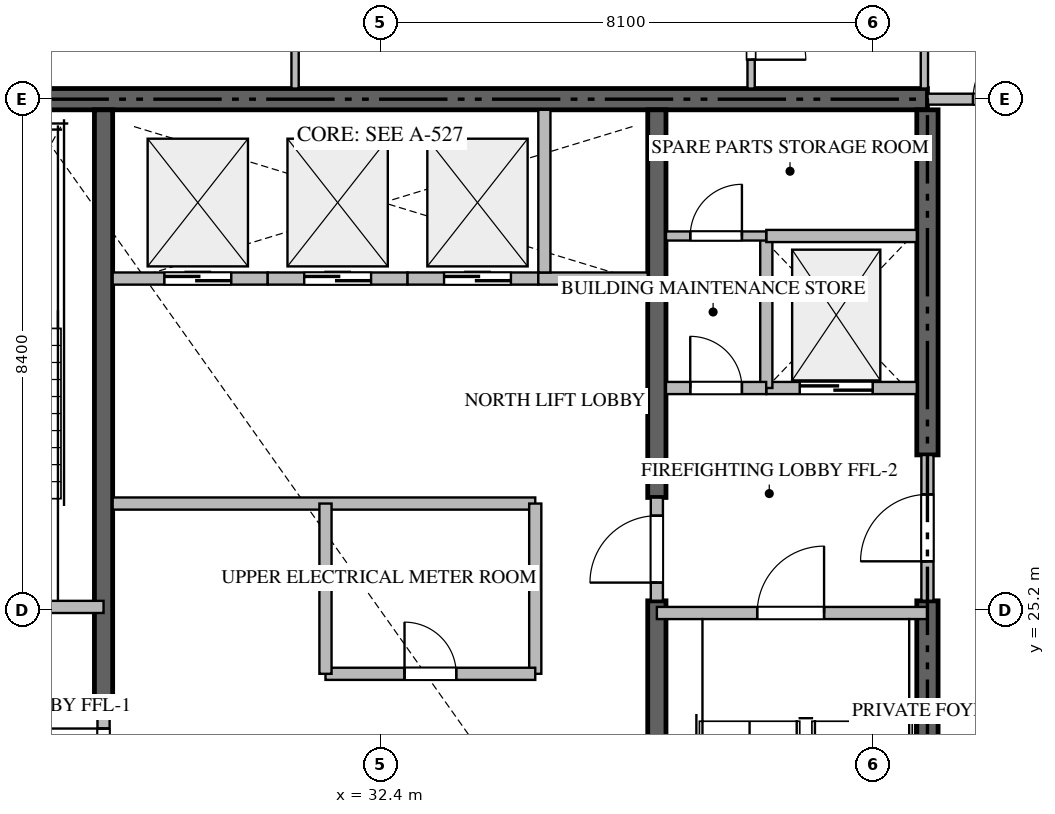
"""IFC4 building model, lengths in metres.
Left out: names, types, materials, properties, quantities, classifications, styles, units other than length and angle.
Written with IfcOpenShell. Run it as: python <this file> out.ifc"""

import sys

from ifc_helpers import new_model, si_unit, direction, frame, frame_2d, origin, place, context, subcontext, project, spatial, rectangle, extrude, source, transform, mapped, element, fill, save


model = new_model("IFC4")
c1 = context("Model", 3, precision=1e-05, world=origin(), true_north=direction((0.0, 1.0)))
c2 = subcontext(c1, "Body", "Model", "MODEL_VIEW")
j1 = project(units=[si_unit("LENGTHUNIT", "METRE"), si_unit("PLANEANGLEUNIT", "RADIAN")], contexts=[c1])
p1 = place(None, origin())
s1 = spatial("IfcSite", under=j1, at=p1, CompositionType="ELEMENT")
p2 = place(p1, origin())
s2 = spatial("IfcBuilding", under=s1, at=p2, CompositionType="ELEMENT")
p3 = place(p2, frame((0.0, 0.0, 260.5)))
s3 = spatial("IfcBuildingStorey", under=s2, at=p3, CompositionType="ELEMENT", Elevation=260.5)
p4 = place(p3, frame((41.4, 33.6, -0.26), z_axis=(0.0, 0.0, 1.0), x_axis=(-1.0, 0.0, 0.0)))
e1 = element("IfcWall", 1, at=p4, inside=s3, PredefinedType="SHEAR", context=c2, shape_type="SweptSolid", body=[
    extrude(rectangle(XDim=18.0, YDim=0.35, at=frame_2d((9.0, 0.0))), origin(), (0.0, 0.0, 1.0), 3.848),
])
p5 = place(p3, frame((41.4, 16.975, -0.26), z_axis=(0.0, 0.0, 1.0), x_axis=(0.0, 1.0, 0.0)))
e2 = element("IfcWall", 2, at=p5, inside=s3, PredefinedType="SHEAR", context=c2, shape_type="SweptSolid", body=[
    extrude(rectangle(XDim=8.375, YDim=0.35, at=frame_2d((4.188, 0.0))), origin(), (0.0, 0.0, 1.0), 3.848),
])
p6 = place(p3, frame((41.4, 27.75, -0.26), z_axis=(0.0, 0.0, 1.0), x_axis=(0.0, 1.0, 0.0)))
e3 = element("IfcWall", 3, at=p6, inside=s3, PredefinedType="SHEAR", context=c2, shape_type="SweptSolid", body=[
    extrude(rectangle(XDim=5.675, YDim=0.35, at=frame_2d((2.837, 0.0))), origin(), (0.0, 0.0, 1.0), 3.848),
])
p7 = place(p3, frame((27.85, 23.55, -0.26), z_axis=(0.0, 0.0, 1.0), x_axis=(0.0, 1.0, 0.0)))
e4 = element("IfcWall", 4, at=p7, inside=s3, PredefinedType="SHEAR", context=c2, shape_type="SweptSolid", body=[
    extrude(rectangle(XDim=9.875, YDim=0.3, at=frame_2d((4.938, 0.0))), origin(), (0.0, 0.0, 1.0), 3.848),
])
p8 = place(p3, frame((36.95, 16.975, -0.26), z_axis=(0.0, 0.0, 1.0), x_axis=(0.0, 1.0, 0.0)))
e5 = element("IfcWall", 5, at=p8, inside=s3, PredefinedType="SHEAR", context=c2, shape_type="SweptSolid", body=[
    extrude(rectangle(XDim=8.375, YDim=0.3, at=frame_2d((4.188, 0.0))), origin(), (0.0, 0.0, 1.0), 3.848),
])
p9 = place(p3, frame((36.95, 27.05, -0.26), z_axis=(0.0, 0.0, 1.0), x_axis=(0.0, 1.0, 0.0)))
e6 = element("IfcWall", 6, at=p9, inside=s3, PredefinedType="SHEAR", context=c2, shape_type="SweptSolid", body=[
    extrude(rectangle(XDim=6.375, YDim=0.3, at=frame_2d((3.188, 0.0))), origin(), (0.0, 0.0, 1.0), 3.848),
])
p10 = place(p3, frame((23.4, 25.25, 0.0), z_axis=(0.0, 0.0, 1.0), x_axis=(1.0, 0.0, 0.0)))
e7 = element("IfcWall", 7, at=p10, inside=s3, PredefinedType="STANDARD", context=c2, shape_type="SweptSolid", body=[
    extrude(rectangle(XDim=4.45, YDim=0.2, at=frame_2d((2.225, 0.0))), origin(), (0.0, 0.0, 1.0), 3.59),
])
p11 = place(p10, frame((1.65, 0.0, 0.0)))
e8 = element("IfcOpeningElement", 8, at=p11, cuts=e7, PredefinedType="OPENING", context=c2, shape_type="SweptSolid", body=[
    extrude(rectangle(XDim=1.1, YDim=2.15, at=frame_2d((0.55, 1.075))), frame((0.0, 0.11, 0.0), z_axis=(0.0, -1.0, 0.0), x_axis=(1.0, 0.0, 0.0)), (0.0, 0.0, 1.0), 0.22),
])
p12 = place(p3, frame((36.95, 25.15, 0.0), z_axis=(0.0, 0.0, 1.0), x_axis=(1.0, 0.0, 0.0)))
e9 = element("IfcWall", 9, at=p12, inside=s3, PredefinedType="STANDARD", context=c2, shape_type="SweptSolid", body=[
    extrude(rectangle(XDim=4.45, YDim=0.2, at=frame_2d((2.225, 0.0))), origin(), (0.0, 0.0, 1.0), 3.59),
])
p13 = place(p12, frame((1.65, 0.0, 0.0)))
e10 = element("IfcOpeningElement", 10, at=p13, cuts=e9, PredefinedType="OPENING", context=c2, shape_type="SweptSolid", body=[
    extrude(rectangle(XDim=1.1, YDim=2.15, at=frame_2d((0.55, 1.075))), frame((0.0, 0.11, 0.0), z_axis=(0.0, -1.0, 0.0), x_axis=(1.0, 0.0, 0.0)), (0.0, 0.0, 1.0), 0.22),
])
p14 = place(p3, frame((38.75, 28.85, 0.0), z_axis=(0.0, 0.0, 1.0), x_axis=(1.0, 0.0, 0.0)))
e11 = element("IfcWall", 11, at=p14, inside=s3, PredefinedType="STANDARD", context=c2, shape_type="SweptSolid", body=[
    extrude(rectangle(XDim=2.475, YDim=0.2, at=frame_2d((1.238, 0.0))), origin(), (0.0, 0.0, 1.0), 3.59),
])
p15 = place(p14, frame((0.55, 0.0, 0.0)))
e12 = element("IfcOpeningElement", 12, at=p15, cuts=e11, PredefinedType="OPENING", context=c2, shape_type="SweptSolid", body=[
    extrude(rectangle(XDim=1.2, YDim=2.2, at=frame_2d((0.6, 1.1))), frame((0.0, 0.11, 0.0), z_axis=(0.0, -1.0, 0.0), x_axis=(1.0, 0.0, 0.0)), (0.0, 0.0, 1.0), 0.22),
])
p16 = place(p3, frame((28.0, 30.65, 0.0), z_axis=(0.0, 0.0, 1.0), x_axis=(1.0, 0.0, 0.0)))
e13 = element("IfcWall", 13, at=p16, inside=s3, PredefinedType="STANDARD", context=c2, shape_type="SweptSolid", body=[
    extrude(rectangle(XDim=2.55, YDim=0.2, at=frame_2d((1.275, 0.0))), origin(), (0.0, 0.0, 1.0), 3.59),
])
p17 = place(p16, frame((0.85, 0.0, 0.0)))
e14 = element("IfcOpeningElement", 14, at=p17, cuts=e13, PredefinedType="OPENING", context=c2, shape_type="SweptSolid", body=[
    extrude(rectangle(XDim=1.1, YDim=2.2, at=frame_2d((0.55, 1.1))), frame((0.0, 0.11, 0.0), z_axis=(0.0, -1.0, 0.0), x_axis=(1.0, 0.0, 0.0)), (0.0, 0.0, 1.0), 0.22),
])
p18 = place(p3, frame((30.55, 30.65, 0.0), z_axis=(0.0, 0.0, 1.0), x_axis=(1.0, 0.0, 0.0)))
e15 = element("IfcWall", 15, at=p18, inside=s3, PredefinedType="STANDARD", context=c2, shape_type="SweptSolid", body=[
    extrude(rectangle(XDim=2.3, YDim=0.2, at=frame_2d((1.15, 0.0))), origin(), (0.0, 0.0, 1.0), 3.59),
])
p19 = place(p18, frame((0.6, 0.0, 0.0)))
e16 = element("IfcOpeningElement", 16, at=p19, cuts=e15, PredefinedType="OPENING", context=c2, shape_type="SweptSolid", body=[
    extrude(rectangle(XDim=1.1, YDim=2.2, at=frame_2d((0.55, 1.1))), frame((0.0, 0.11, 0.0), z_axis=(0.0, -1.0, 0.0), x_axis=(1.0, 0.0, 0.0)), (0.0, 0.0, 1.0), 0.22),
])
p20 = place(p3, frame((32.85, 30.65, 0.0), z_axis=(0.0, 0.0, 1.0), x_axis=(1.0, 0.0, 0.0)))
e17 = element("IfcWall", 17, at=p20, inside=s3, PredefinedType="STANDARD", context=c2, shape_type="SweptSolid", body=[
    extrude(rectangle(XDim=2.15, YDim=0.2, at=frame_2d((1.075, 0.0))), origin(), (0.0, 0.0, 1.0), 3.59),
])
p21 = place(p20, frame((0.6, 0.0, 0.0)))
e18 = element("IfcOpeningElement", 18, at=p21, cuts=e17, PredefinedType="OPENING", context=c2, shape_type="SweptSolid", body=[
    extrude(rectangle(XDim=1.1, YDim=2.2, at=frame_2d((0.55, 1.1))), frame((0.0, 0.11, 0.0), z_axis=(0.0, -1.0, 0.0), x_axis=(1.0, 0.0, 0.0)), (0.0, 0.0, 1.0), 0.22),
])
p22 = place(p3, frame((35.0, 30.65, 0.0), z_axis=(0.0, 0.0, 1.0), x_axis=(1.0, 0.0, 0.0)))
e19 = element("IfcWall", 19, at=p22, inside=s3, PredefinedType="STANDARD", context=c2, shape_type="SweptSolid", body=[
    extrude(rectangle(XDim=1.8, YDim=0.2, at=frame_2d((0.9, 0.0))), origin(), (0.0, 0.0, 1.0), 3.59),
])
p23 = place(p3, frame((35.1, 30.75, 0.0), z_axis=(0.0, 0.0, 1.0), x_axis=(0.0, 1.0, 0.0)))
e20 = element("IfcWall", 20, at=p23, inside=s3, PredefinedType="STANDARD", context=c2, shape_type="SweptSolid", body=[
    extrude(rectangle(XDim=2.675, YDim=0.2, at=frame_2d((1.337, 0.0))), origin(), (0.0, 0.0, 1.0), 3.59),
])
p24 = place(p3, frame((38.75, 28.85, 0.0), z_axis=(0.0, 0.0, 1.0), x_axis=(0.0, 1.0, 0.0)))
e21 = element("IfcWall", 21, at=p24, inside=s3, PredefinedType="STANDARD", context=c2, shape_type="SweptSolid", body=[
    extrude(rectangle(XDim=2.5, YDim=0.2, at=frame_2d((1.25, 0.0))), origin(), (0.0, 0.0, 1.0), 3.59),
])
p25 = place(p3, frame((38.75, 31.35, 0.0), z_axis=(0.0, 0.0, 1.0), x_axis=(1.0, 0.0, 0.0)))
e22 = element("IfcWall", 22, at=p25, inside=s3, PredefinedType="STANDARD", context=c2, shape_type="SweptSolid", body=[
    extrude(rectangle(XDim=2.475, YDim=0.2, at=frame_2d((1.238, 0.0))), origin(), (0.0, 0.0, 1.0), 3.59),
])
p26 = place(p3, frame((37.1, 28.85, 0.0), z_axis=(0.0, 0.0, 1.0), x_axis=(1.0, 0.0, 0.0)))
e23 = element("IfcWall", 23, at=p26, inside=s3, PredefinedType="STANDARD", context=c2, shape_type="SweptSolid", body=[
    extrude(rectangle(XDim=1.648, YDim=0.2, at=frame_2d((0.824, 0.0))), origin(), (0.0, 0.0, 1.0), 3.59),
])
p27 = place(p26, frame((0.399, 0.0, 0.0)))
e24 = element("IfcOpeningElement", 24, at=p27, cuts=e23, PredefinedType="OPENING", context=c2, shape_type="SweptSolid", body=[
    extrude(rectangle(XDim=0.85, YDim=2.1, at=frame_2d((0.425, 1.05))), frame((0.0, 0.11, 0.0), z_axis=(0.0, -1.0, 0.0), x_axis=(1.0, 0.0, 0.0)), (0.0, 0.0, 1.0), 0.22),
])
p28 = place(p3, frame((41.4, 25.352, 0.0), z_axis=(0.0, 0.0, 1.0), x_axis=(0.0, 1.0, 0.0)))
e25 = element("IfcWall", 25, at=p28, inside=s3, PredefinedType="STANDARD", context=c2, shape_type="SweptSolid", body=[
    extrude(rectangle(XDim=2.396, YDim=0.2, at=frame_2d((1.198, 0.0))), origin(), (0.0, 0.0, 1.0), 3.59),
])
p29 = place(p28, frame((0.648, 0.0, 0.0)))
e26 = element("IfcOpeningElement", 26, at=p29, cuts=e25, PredefinedType="OPENING", context=c2, shape_type="SweptSolid", body=[
    extrude(rectangle(XDim=1.1, YDim=2.15, at=frame_2d((0.55, 1.075))), frame((0.0, 0.11, 0.0), z_axis=(0.0, -1.0, 0.0), x_axis=(1.0, 0.0, 0.0)), (0.0, 0.0, 1.0), 0.22),
])
p30 = place(p3, frame((27.85, 21.852, 0.0), z_axis=(0.0, 0.0, 1.0), x_axis=(0.0, 1.0, 0.0)))
e27 = element("IfcWall", 27, at=p30, inside=s3, PredefinedType="STANDARD", context=c2, shape_type="SweptSolid", body=[
    extrude(rectangle(XDim=1.696, YDim=0.2, at=frame_2d((0.848, 0.0))), origin(), (0.0, 0.0, 1.0), 3.59),
])
p31 = place(p30, frame((0.298, 0.0, 0.0)))
e28 = element("IfcOpeningElement", 28, at=p31, cuts=e27, PredefinedType="OPENING", context=c2, shape_type="SweptSolid", body=[
    extrude(rectangle(XDim=1.1, YDim=2.15, at=frame_2d((0.55, 1.075))), frame((0.0, 0.11, 0.0), z_axis=(0.0, -1.0, 0.0), x_axis=(1.0, 0.0, 0.0)), (0.0, 0.0, 1.0), 0.22),
])
p32 = place(p3, frame((36.95, 25.352, 0.0), z_axis=(0.0, 0.0, 1.0), x_axis=(0.0, 1.0, 0.0)))
e29 = element("IfcWall", 29, at=p32, inside=s3, PredefinedType="STANDARD", context=c2, shape_type="SweptSolid", body=[
    extrude(rectangle(XDim=1.696, YDim=0.2, at=frame_2d((0.848, 0.0))), origin(), (0.0, 0.0, 1.0), 3.59),
])
p33 = place(p32, frame((0.298, 0.0, 0.0)))
e30 = element("IfcOpeningElement", 30, at=p33, cuts=e29, PredefinedType="OPENING", context=c2, shape_type="SweptSolid", body=[
    extrude(rectangle(XDim=1.1, YDim=2.15, at=frame_2d((0.55, 1.075))), frame((0.0, 0.11, 0.0), z_axis=(0.0, -1.0, 0.0), x_axis=(1.0, 0.0, 0.0)), (0.0, 0.0, 1.0), 0.22),
])
p34 = place(p3, frame((37.1, 31.35, 0.0), z_axis=(0.0, 0.0, 1.0), x_axis=(1.0, 0.0, 0.0)))
e31 = element("IfcWall", 31, at=p34, inside=s3, PredefinedType="PARTITIONING", context=c2, shape_type="SweptSolid", body=[
    extrude(rectangle(XDim=1.648, YDim=0.15, at=frame_2d((0.824, 0.0))), origin(), (0.0, 0.0, 1.0), 3.59),
])
p35 = place(p34, frame((0.399, 0.0, 0.0)))
e32 = element("IfcOpeningElement", 32, at=p35, cuts=e31, PredefinedType="OPENING", context=c2, shape_type="SweptSolid", body=[
    extrude(rectangle(XDim=0.85, YDim=2.1, at=frame_2d((0.425, 1.05))), frame((0.0, 0.085, 0.0), z_axis=(0.0, -1.0, 0.0), x_axis=(1.0, 0.0, 0.0)), (0.0, 0.0, 1.0), 0.17),
])
p36 = place(p3, frame((28.0, 26.95, 0.0), z_axis=(0.0, 0.0, 1.0), x_axis=(1.0, 0.0, 0.0)))
e33 = element("IfcWall", 33, at=p36, inside=s3, PredefinedType="STANDARD", context=c2, shape_type="SweptSolid", body=[
    extrude(rectangle(XDim=6.95, YDim=0.2, at=frame_2d((3.475, 0.0))), origin(), (0.0, 0.0, 1.0), 3.59),
])
p37 = place(p3, frame((34.95, 24.15, 0.0), z_axis=(0.0, 0.0, 1.0), x_axis=(0.0, 1.0, 0.0)))
e34 = element("IfcWall", 34, at=p37, inside=s3, PredefinedType="STANDARD", context=c2, shape_type="SweptSolid", body=[
    extrude(rectangle(XDim=2.8, YDim=0.2, at=frame_2d((1.4, 0.0))), origin(), (0.0, 0.0, 1.0), 3.59),
])
p38 = place(p3, frame((31.5, 24.15, 0.0), z_axis=(0.0, 0.0, 1.0), x_axis=(1.0, 0.0, 0.0)))
e35 = element("IfcWall", 35, at=p38, inside=s3, PredefinedType="STANDARD", context=c2, shape_type="SweptSolid", body=[
    extrude(rectangle(XDim=3.45, YDim=0.2, at=frame_2d((1.725, 0.0))), origin(), (0.0, 0.0, 1.0), 3.59),
])
p39 = place(p38, frame((1.3, 0.0, 0.0)))
e36 = element("IfcOpeningElement", 36, at=p39, cuts=e35, PredefinedType="OPENING", context=c2, shape_type="SweptSolid", body=[
    extrude(rectangle(XDim=0.85, YDim=2.1, at=frame_2d((0.425, 1.05))), frame((0.0, 0.11, 0.0), z_axis=(0.0, -1.0, 0.0), x_axis=(1.0, 0.0, 0.0)), (0.0, 0.0, 1.0), 0.22),
])
p40 = place(p3, frame((31.5, 24.15, 0.0), z_axis=(0.0, 0.0, 1.0), x_axis=(0.0, 1.0, 0.0)))
e37 = element("IfcWall", 37, at=p40, inside=s3, PredefinedType="STANDARD", context=c2, shape_type="SweptSolid", body=[
    extrude(rectangle(XDim=2.8, YDim=0.2, at=frame_2d((1.4, 0.0))), origin(), (0.0, 0.0, 1.0), 3.59),
])
p41 = place(p3, frame((41.402, 33.6, 0.0), z_axis=(0.0, 0.0, 1.0), x_axis=(1.0, 0.0, 0.0)))
e38 = element("IfcWall", 38, at=p41, inside=s3, PredefinedType="PARTITIONING", context=c2, shape_type="SweptSolid", body=[
    extrude(rectangle(XDim=2.496, YDim=0.18, at=frame_2d((1.248, 0.0))), origin(), (0.0, 0.0, 1.0), 3.59),
])
p42 = place(p41, frame((0.748, 0.0, 0.0)))
e39 = element("IfcOpeningElement", 39, at=p42, cuts=e38, PredefinedType="OPENING", context=c2, shape_type="SweptSolid", body=[
    extrude(rectangle(XDim=1.0, YDim=2.15, at=frame_2d((0.5, 1.075))), frame((0.0, 0.1, 0.0), z_axis=(0.0, -1.0, 0.0), x_axis=(1.0, 0.0, 0.0)), (0.0, 0.0, 1.0), 0.2),
])
p43 = place(p3, frame((41.35, 36.35, 0.0), z_axis=(0.0, 0.0, 1.0), x_axis=(0.0, -1.0, 0.0)))
e40 = element("IfcWall", 40, at=p43, inside=s3, PredefinedType="PARTITIONING", context=c2, shape_type="SweptSolid", body=[
    extrude(rectangle(XDim=2.575, YDim=0.12, at=frame_2d((1.288, 0.0))), origin(), (0.0, 0.0, 1.0), 3.59),
])
p44 = place(p3, frame((38.5, 35.75, 0.0), z_axis=(0.0, 0.0, 1.0), x_axis=(0.0, -1.0, 0.0)))
e41 = element("IfcWall", 41, at=p44, inside=s3, PredefinedType="PARTITIONING", context=c2, shape_type="SweptSolid", body=[
    extrude(rectangle(XDim=1.975, YDim=0.12, at=frame_2d((0.988, 0.0))), origin(), (0.0, 0.0, 1.0), 3.59),
])
p45 = place(p44, frame((0.601, 0.0, 0.0)))
e42 = element("IfcOpeningElement", 42, at=p45, cuts=e41, PredefinedType="OPENING", context=c2, shape_type="SweptSolid", body=[
    extrude(rectangle(XDim=0.9, YDim=2.1, at=frame_2d((0.45, 1.05))), frame((0.0, 0.07, 0.0), z_axis=(0.0, -1.0, 0.0), x_axis=(1.0, 0.0, 0.0)), (0.0, 0.0, 1.0), 0.14),
])
p46 = place(p3, frame((31.0, 35.748, 0.0), z_axis=(0.0, 0.0, 1.0), x_axis=(0.0, -1.0, 0.0)))
e43 = element("IfcWall", 43, at=p46, inside=s3, PredefinedType="PARTITIONING", context=c2, shape_type="SweptSolid", body=[
    extrude(rectangle(XDim=1.973, YDim=0.12, at=frame_2d((0.987, 0.0))), origin(), (0.0, 0.0, 1.0), 3.59),
])
m1 = source(origin(), c2, "Body", "SweptSolid", [
    extrude(rectangle(XDim=1.1, YDim=2.15, at=frame_2d((0.55, 1.075))), frame((0.0, 0.025, 0.0), z_axis=(0.0, -1.0, 0.0), x_axis=(1.0, 0.0, 0.0)), (0.0, 0.0, 1.0), 0.05),
])
p47 = place(p13, origin())
e44 = element("IfcDoor", 44, at=p47, inside=s3, OperationType="SINGLE_SWING_RIGHT", PredefinedType="DOOR", context=c2, shape_type="MappedRepresentation", body=[
    mapped(m1, transform((0.0, 0.0, 0.0), scale=1.0)),
])
fill(e10, e44)
m2 = source(origin(), c2, "Body", "SweptSolid", [
    extrude(rectangle(XDim=1.2, YDim=2.2, at=frame_2d((0.6, 1.1))), frame((0.0, 0.025, 0.0), z_axis=(0.0, -1.0, 0.0), x_axis=(1.0, 0.0, 0.0)), (0.0, 0.0, 1.0), 0.05),
])
p48 = place(p15, origin())
e45 = element("IfcDoor", 45, at=p48, inside=s3, OperationType="DOUBLE_DOOR_SLIDING", PredefinedType="DOOR", context=c2, shape_type="MappedRepresentation", body=[
    mapped(m2, transform((0.0, 0.0, 0.0), scale=1.0)),
])
fill(e12, e45)
m3 = source(origin(), c2, "Body", "SweptSolid", [
    extrude(rectangle(XDim=1.1, YDim=2.2, at=frame_2d((0.55, 1.1))), frame((0.0, 0.025, 0.0), z_axis=(0.0, -1.0, 0.0), x_axis=(1.0, 0.0, 0.0)), (0.0, 0.0, 1.0), 0.05),
])
p49 = place(p17, origin())
e46 = element("IfcDoor", 46, at=p49, inside=s3, OperationType="DOUBLE_DOOR_SLIDING", PredefinedType="DOOR", context=c2, shape_type="MappedRepresentation", body=[
    mapped(m3, transform((0.0, 0.0, 0.0), scale=1.0)),
])
fill(e14, e46)
p50 = place(p19, origin())
e47 = element("IfcDoor", 47, at=p50, inside=s3, OperationType="DOUBLE_DOOR_SLIDING", PredefinedType="DOOR", context=c2, shape_type="MappedRepresentation", body=[
    mapped(m3, transform((0.0, 0.0, 0.0), scale=1.0)),
])
fill(e16, e47)
p51 = place(p21, origin())
e48 = element("IfcDoor", 48, at=p51, inside=s3, OperationType="DOUBLE_DOOR_SLIDING", PredefinedType="DOOR", context=c2, shape_type="MappedRepresentation", body=[
    mapped(m3, transform((0.0, 0.0, 0.0), scale=1.0)),
])
fill(e18, e48)
m4 = source(origin(), c2, "Body", "SweptSolid", [
    extrude(rectangle(XDim=0.85, YDim=2.1, at=frame_2d((0.425, 1.05))), frame((0.0, 0.025, 0.0), z_axis=(0.0, -1.0, 0.0), x_axis=(1.0, 0.0, 0.0)), (0.0, 0.0, 1.0), 0.05),
])
p52 = place(p27, origin())
e49 = element("IfcDoor", 49, at=p52, inside=s3, OperationType="SINGLE_SWING_LEFT", PredefinedType="DOOR", context=c2, shape_type="MappedRepresentation", body=[
    mapped(m4, transform((0.0, 0.0, 0.0), scale=1.0)),
])
fill(e24, e49)
p53 = place(p29, origin())
e50 = element("IfcDoor", 50, at=p53, inside=s3, OperationType="SINGLE_SWING_LEFT", PredefinedType="DOOR", context=c2, shape_type="MappedRepresentation", body=[
    mapped(m1, transform((0.0, 0.0, 0.0), scale=1.0)),
])
fill(e26, e50)
p54 = place(p31, origin())
e51 = element("IfcDoor", 51, at=p54, inside=s3, OperationType="SINGLE_SWING_RIGHT", PredefinedType="DOOR", context=c2, shape_type="MappedRepresentation", body=[
    mapped(m1, transform((0.0, 0.0, 0.0), scale=1.0)),
])
fill(e28, e51)
p55 = place(p33, origin())
e52 = element("IfcDoor", 52, at=p55, inside=s3, OperationType="SINGLE_SWING_LEFT", PredefinedType="DOOR", context=c2, shape_type="MappedRepresentation", body=[
    mapped(m1, transform((0.0, 0.0, 0.0), scale=1.0)),
])
fill(e30, e52)
p56 = place(p35, origin())
e53 = element("IfcDoor", 53, at=p56, inside=s3, OperationType="SINGLE_SWING_RIGHT", PredefinedType="DOOR", context=c2, shape_type="MappedRepresentation", body=[
    mapped(m4, transform((0.0, 0.0, 0.0), scale=1.0)),
])
fill(e32, e53)
p57 = place(p39, origin())
e54 = element("IfcDoor", 54, at=p57, inside=s3, OperationType="SINGLE_SWING_LEFT", PredefinedType="DOOR", context=c2, shape_type="MappedRepresentation", body=[
    mapped(m4, transform((0.0, 0.0, 0.0), scale=1.0)),
])
fill(e36, e54)
m5 = source(origin(), c2, "Body", "SweptSolid", [
    extrude(rectangle(XDim=1.0, YDim=2.15, at=frame_2d((0.5, 1.075))), frame((0.0, 0.025, 0.0), z_axis=(0.0, -1.0, 0.0), x_axis=(1.0, 0.0, 0.0)), (0.0, 0.0, 1.0), 0.05),
])
p58 = place(p42, origin())
e55 = element("IfcDoor", 55, at=p58, inside=s3, OperationType="SINGLE_SWING_RIGHT", PredefinedType="DOOR", context=c2, shape_type="MappedRepresentation", body=[
    mapped(m5, transform((0.0, 0.0, 0.0), scale=1.0)),
])
fill(e39, e55)
m6 = source(origin(), c2, "Body", "SweptSolid", [
    extrude(rectangle(XDim=0.9, YDim=2.1, at=frame_2d((0.45, 1.05))), frame((0.0, 0.025, 0.0), z_axis=(0.0, -1.0, 0.0), x_axis=(1.0, 0.0, 0.0)), (0.0, 0.0, 1.0), 0.05),
])
p59 = place(p45, origin())
e56 = element("IfcDoor", 56, at=p59, inside=s3, OperationType="SINGLE_SWING_RIGHT", PredefinedType="DOOR", context=c2, shape_type="MappedRepresentation", body=[
    mapped(m6, transform((0.0, 0.0, 0.0), scale=1.0)),
])
fill(e42, e56)
save(model, sys.argv[1])
